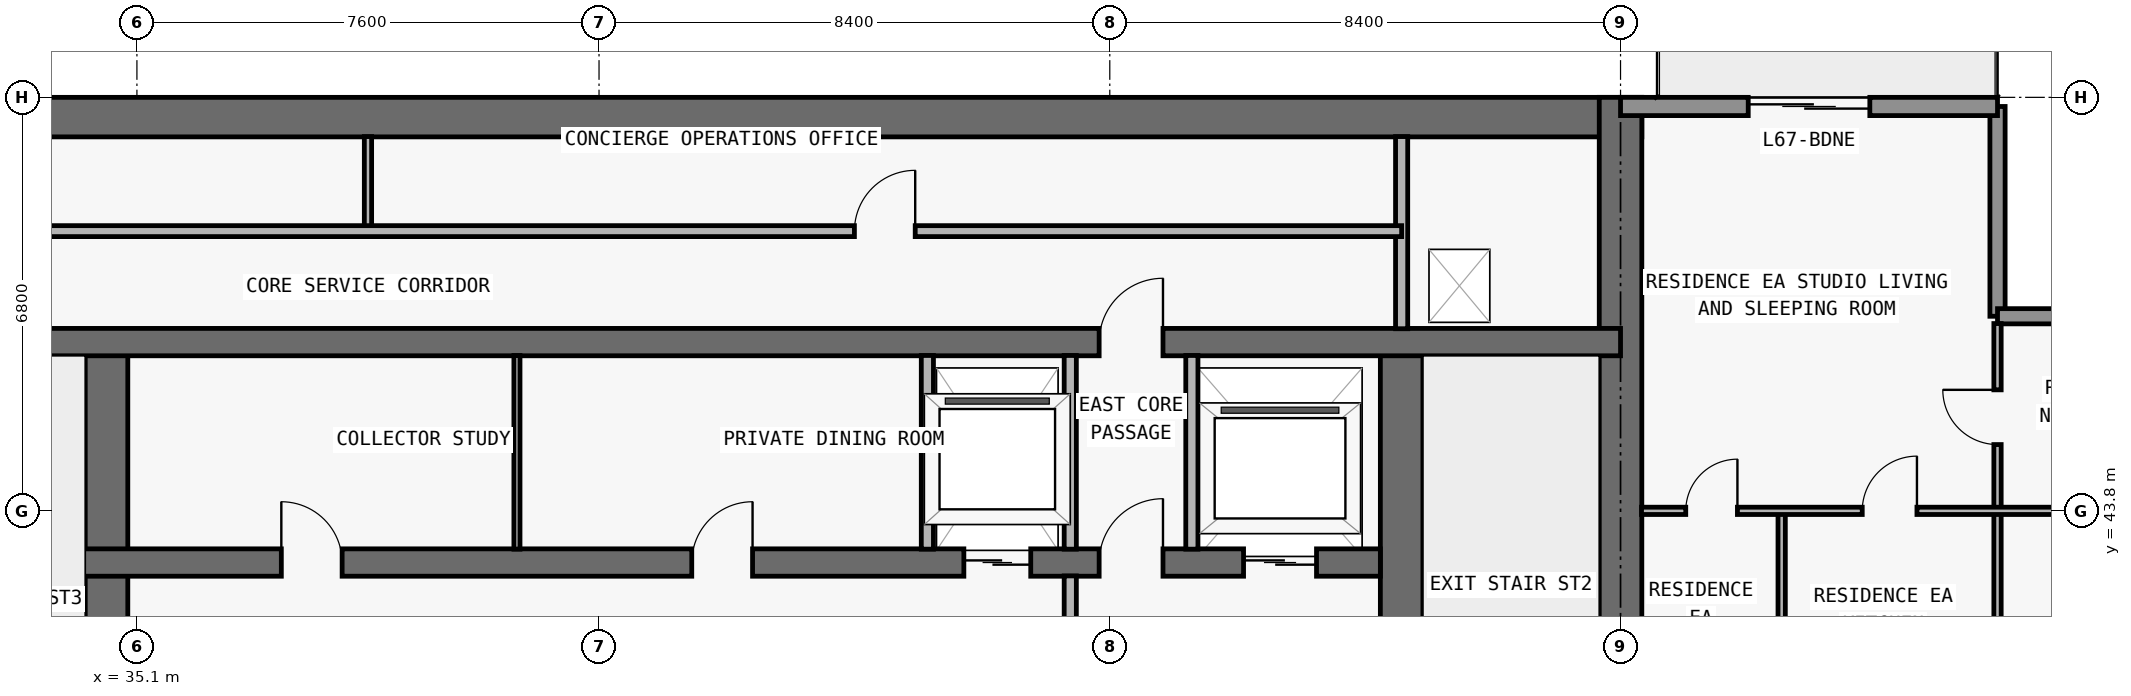
"""IFC4 building model, lengths in metres.
Left out: names, types, materials, properties, quantities, classifications, styles, units other than length and angle.
Written with IfcOpenShell. Run it as: python <this file> out.ifc"""

import sys

from ifc_helpers import new_model, si_unit, direction, frame, frame_2d, origin, place, context, subcontext, project, spatial, rectangle, extrude, element, fill, save


model = new_model("IFC4")
c1 = context("Model", 3, precision=1e-05, world=origin(), true_north=direction((0.0, 1.0)))
c2 = subcontext(c1, "Body", "Model", "MODEL_VIEW")
j1 = project(units=[si_unit("LENGTHUNIT", "METRE"), si_unit("PLANEANGLEUNIT", "RADIAN")], contexts=[c1])
p1 = place(None, origin())
s1 = spatial("IfcSite", under=j1, at=p1, CompositionType="ELEMENT")
p2 = place(p1, origin())
s2 = spatial("IfcBuilding", under=s1, at=p2, CompositionType="ELEMENT")
p3 = place(p2, frame((0.0, 0.0, 239.7)))
s3 = spatial("IfcBuildingStorey", under=s2, at=p3, CompositionType="ELEMENT", Elevation=239.7)
p4 = place(p3, frame((17.95, 50.275, 0.0), z_axis=(0.0, 0.0, 1.0), x_axis=(1.0, 0.0, 0.0)))
e1 = element("IfcWall", 1, at=p4, inside=s3, PredefinedType="SHEAR", context=c2, shape_type="SweptSolid", body=[
    extrude(rectangle(XDim=41.9, YDim=0.65, at=frame_2d((20.95, 0.0))), origin(), (0.0, 0.0, 1.0), 3.05),
])
p5 = place(p3, frame((59.5, 36.65, 0.0), z_axis=(0.0, 0.0, 1.0), x_axis=(0.0, 1.0, 0.0)))
e2 = element("IfcWall", 2, at=p5, inside=s3, PredefinedType="SHEAR", context=c2, shape_type="SweptSolid", body=[
    extrude(rectangle(XDim=13.95, YDim=0.7, at=frame_2d((6.975, 0.0))), origin(), (0.0, 0.0, 1.0), 3.05),
])
p6 = place(p3, frame((55.9, 37.0, 0.0), z_axis=(0.0, 0.0, 1.0), x_axis=(0.0, 1.0, 0.0)))
e3 = element("IfcWall", 3, at=p6, inside=s3, PredefinedType="SHEAR", context=c2, shape_type="SweptSolid", body=[
    extrude(rectangle(XDim=9.575, YDim=0.7, at=frame_2d((4.788, 0.0))), origin(), (0.0, 0.0, 1.0), 3.05),
])
p7 = place(p6, frame((0.55, 0.0, 0.0)))
e4 = element("IfcOpeningElement", 4, at=p7, cuts=e3, PredefinedType="OPENING", context=c2, shape_type="SweptSolid", body=[
    extrude(rectangle(XDim=1.1, YDim=2.15, at=frame_2d((0.55, 1.075))), frame((0.0, 0.36, 0.0), z_axis=(0.0, -1.0, 0.0), x_axis=(1.0, 0.0, 0.0)), (0.0, 0.0, 1.0), 0.72),
])
p8 = place(p3, frame((34.6, 37.0, 0.0), z_axis=(0.0, 0.0, 1.0), x_axis=(0.0, 1.0, 0.0)))
e5 = element("IfcWall", 5, at=p8, inside=s3, PredefinedType="SHEAR", context=c2, shape_type="SweptSolid", body=[
    extrude(rectangle(XDim=9.575, YDim=0.7, at=frame_2d((4.788, 0.0))), origin(), (0.0, 0.0, 1.0), 3.05),
])
p9 = place(p3, frame((22.25, 42.95, 0.0), z_axis=(0.0, 0.0, 1.0), x_axis=(1.0, 0.0, 0.0)))
e6 = element("IfcWall", 6, at=p9, inside=s3, PredefinedType="SHEAR", context=c2, shape_type="SweptSolid", body=[
    extrude(rectangle(XDim=33.3, YDim=0.45, at=frame_2d((16.65, 0.0))), origin(), (0.0, 0.0, 1.0), 3.05),
])
p10 = place(p9, frame((1.05, 0.0, 0.0)))
e7 = element("IfcOpeningElement", 7, at=p10, cuts=e6, PredefinedType="OPENING", context=c2, shape_type="SweptSolid", body=[
    extrude(rectangle(XDim=1.2, YDim=2.2, at=frame_2d((0.6, 1.1))), frame((0.0, 0.235, 0.0), z_axis=(0.0, -1.0, 0.0), x_axis=(1.0, 0.0, 0.0)), (0.0, 0.0, 1.0), 0.47),
])
p11 = place(p9, frame((31.05, 0.0, 0.0)))
e8 = element("IfcOpeningElement", 8, at=p11, cuts=e6, PredefinedType="OPENING", context=c2, shape_type="SweptSolid", body=[
    extrude(rectangle(XDim=1.2, YDim=2.2, at=frame_2d((0.6, 1.1))), frame((0.0, 0.235, 0.0), z_axis=(0.0, -1.0, 0.0), x_axis=(1.0, 0.0, 0.0)), (0.0, 0.0, 1.0), 0.47),
])
p12 = place(p9, frame((26.45, 0.0, 0.0)))
e9 = element("IfcOpeningElement", 9, at=p12, cuts=e6, PredefinedType="OPENING", context=c2, shape_type="SweptSolid", body=[
    extrude(rectangle(XDim=1.1, YDim=2.2, at=frame_2d((0.55, 1.1))), frame((0.0, 0.235, 0.0), z_axis=(0.0, -1.0, 0.0), x_axis=(1.0, 0.0, 0.0)), (0.0, 0.0, 1.0), 0.47),
])
p13 = place(p9, frame((5.95, 0.0, 0.0)))
e10 = element("IfcOpeningElement", 10, at=p13, cuts=e6, PredefinedType="OPENING", context=c2, shape_type="SweptSolid", body=[
    extrude(rectangle(XDim=1.1, YDim=2.2, at=frame_2d((0.55, 1.1))), frame((0.0, 0.235, 0.0), z_axis=(0.0, -1.0, 0.0), x_axis=(1.0, 0.0, 0.0)), (0.0, 0.0, 1.0), 0.47),
])
p14 = place(p9, frame((3.625, 0.0, 0.0)))
e11 = element("IfcOpeningElement", 11, at=p14, cuts=e6, PredefinedType="OPENING", context=c2, shape_type="SweptSolid", body=[
    extrude(rectangle(XDim=1.05, YDim=2.15, at=frame_2d((0.525, 1.075))), frame((0.0, 0.235, 0.0), z_axis=(0.0, -1.0, 0.0), x_axis=(1.0, 0.0, 0.0)), (0.0, 0.0, 1.0), 0.47),
])
p15 = place(p9, frame((28.675, 0.0, 0.0)))
e12 = element("IfcOpeningElement", 12, at=p15, cuts=e6, PredefinedType="OPENING", context=c2, shape_type="SweptSolid", body=[
    extrude(rectangle(XDim=1.05, YDim=2.15, at=frame_2d((0.525, 1.075))), frame((0.0, 0.235, 0.0), z_axis=(0.0, -1.0, 0.0), x_axis=(1.0, 0.0, 0.0)), (0.0, 0.0, 1.0), 0.47),
])
p16 = place(p9, frame((15.225, 0.0, 0.0)))
e13 = element("IfcOpeningElement", 13, at=p16, cuts=e6, PredefinedType="OPENING", context=c2, shape_type="SweptSolid", body=[
    extrude(rectangle(XDim=1.0, YDim=2.2, at=frame_2d((0.5, 1.1))), frame((0.0, 0.235, 0.0), z_axis=(0.0, -1.0, 0.0), x_axis=(1.0, 0.0, 0.0)), (0.0, 0.0, 1.0), 0.47),
])
p17 = place(p9, frame((21.975, 0.0, 0.0)))
e14 = element("IfcOpeningElement", 14, at=p17, cuts=e6, PredefinedType="OPENING", context=c2, shape_type="SweptSolid", body=[
    extrude(rectangle(XDim=1.0, YDim=2.2, at=frame_2d((0.5, 1.1))), frame((0.0, 0.235, 0.0), z_axis=(0.0, -1.0, 0.0), x_axis=(1.0, 0.0, 0.0)), (0.0, 0.0, 1.0), 0.47),
])
p18 = place(p3, frame((18.3, 46.575, 0.0), z_axis=(0.0, 0.0, 1.0), x_axis=(1.0, 0.0, 0.0)))
e15 = element("IfcWall", 15, at=p18, inside=s3, PredefinedType="SHEAR", context=c2, shape_type="SweptSolid", body=[
    extrude(rectangle(XDim=41.2, YDim=0.45, at=frame_2d((20.6, 0.0))), origin(), (0.0, 0.0, 1.0), 3.05),
])
p19 = place(p18, frame((7.575, 0.0, 0.0)))
e16 = element("IfcOpeningElement", 16, at=p19, cuts=e15, PredefinedType="OPENING", context=c2, shape_type="SweptSolid", body=[
    extrude(rectangle(XDim=1.05, YDim=2.15, at=frame_2d((0.525, 1.075))), frame((0.0, 0.235, 0.0), z_axis=(0.0, -1.0, 0.0), x_axis=(1.0, 0.0, 0.0)), (0.0, 0.0, 1.0), 0.47),
])
p20 = place(p18, frame((32.625, 0.0, 0.0)))
e17 = element("IfcOpeningElement", 17, at=p20, cuts=e15, PredefinedType="OPENING", context=c2, shape_type="SweptSolid", body=[
    extrude(rectangle(XDim=1.05, YDim=2.15, at=frame_2d((0.525, 1.075))), frame((0.0, 0.235, 0.0), z_axis=(0.0, -1.0, 0.0), x_axis=(1.0, 0.0, 0.0)), (0.0, 0.0, 1.0), 0.47),
])
p21 = place(p3, frame((65.7, 50.45, 0.0), z_axis=(0.0, 0.0, 1.0), x_axis=(0.0, -1.0, 0.0)))
e18 = element("IfcWall", 18, at=p21, inside=s3, PredefinedType="ELEMENTEDWALL", context=c2, shape_type="SweptSolid", body=[
    extrude(rectangle(XDim=3.45, YDim=0.25, at=frame_2d((1.725, 0.0))), origin(), (0.0, 0.0, 1.0), 3.05),
])
p22 = place(p3, frame((65.7, 47.0, 0.0), z_axis=(0.0, 0.0, 1.0), x_axis=(1.0, 0.0, 0.0)))
e19 = element("IfcWall", 19, at=p22, inside=s3, PredefinedType="ELEMENTEDWALL", context=c2, shape_type="SweptSolid", body=[
    extrude(rectangle(XDim=3.85, YDim=0.25, at=frame_2d((1.925, 0.0))), origin(), (0.0, 0.0, 1.0), 3.05),
])
p23 = place(p3, frame((59.5, 50.45, 0.0), z_axis=(0.0, 0.0, 1.0), x_axis=(1.0, 0.0, 0.0)))
e20 = element("IfcWall", 20, at=p23, inside=s3, PredefinedType="STANDARD", context=c2, shape_type="SweptSolid", body=[
    extrude(rectangle(XDim=6.2, YDim=0.3, at=frame_2d((3.1, 0.0))), origin(), (0.0, 0.0, 1.0), 3.05),
])
p24 = place(p23, frame((2.1, 0.0, 0.0)))
e21 = element("IfcOpeningElement", 21, at=p24, cuts=e20, PredefinedType="OPENING", context=c2, shape_type="SweptSolid", body=[
    extrude(rectangle(XDim=2.0, YDim=2.3, at=frame_2d((1.0, 1.15))), frame((0.0, 0.16, 0.0), z_axis=(0.0, -1.0, 0.0), x_axis=(1.0, 0.0, 0.0)), (0.0, 0.0, 1.0), 0.32),
])
p25 = place(p3, frame((38.9, 48.4, 0.0), z_axis=(0.0, 0.0, 1.0), x_axis=(0.0, 1.0, 0.0)))
e22 = element("IfcWall", 22, at=p25, inside=s3, PredefinedType="PARTITIONING", context=c2, shape_type="SweptSolid", body=[
    extrude(rectangle(XDim=1.555, YDim=0.12, at=frame_2d((0.778, 0.0))), origin(), (0.0, 0.0, 1.0), 3.05),
])
p26 = place(p3, frame((41.35, 43.17, 0.0), z_axis=(0.0, 0.0, 1.0), x_axis=(0.0, 1.0, 0.0)))
e23 = element("IfcWall", 23, at=p26, inside=s3, PredefinedType="MOVABLE", context=c2, shape_type="SweptSolid", body=[
    extrude(rectangle(XDim=3.185, YDim=0.1, at=frame_2d((1.593, 0.0))), origin(), (0.0, 0.0, 1.0), 3.05),
])
p27 = place(p3, frame((48.1, 43.17, 0.0), z_axis=(0.0, 0.0, 1.0), x_axis=(0.0, 1.0, 0.0)))
e24 = element("IfcWall", 24, at=p27, inside=s3, PredefinedType="PARTITIONING", context=c2, shape_type="SweptSolid", body=[
    extrude(rectangle(XDim=3.185, YDim=0.2, at=frame_2d((1.593, 0.0))), origin(), (0.0, 0.0, 1.0), 3.05),
])
p28 = place(p3, frame((50.45, 37.345, 0.0), z_axis=(0.0, 0.0, 1.0), x_axis=(0.0, 1.0, 0.0)))
e25 = element("IfcWall", 25, at=p28, inside=s3, PredefinedType="PARTITIONING", context=c2, shape_type="SweptSolid", body=[
    extrude(rectangle(XDim=5.385, YDim=0.2, at=frame_2d((2.692, 0.0))), origin(), (0.0, 0.0, 1.0), 3.05),
])
for number, where, z_axis, x_axis in (
    (26, (50.45, 43.17, 0.0), (0.0, 0.0, 1.0), (0.0, 1.0, 0.0)),
    (27, (52.45, 43.17, 0.0), (0.0, 0.0, 1.0), (0.0, 1.0, 0.0)),
):
    element("IfcWall", number, at=place(p3, frame(where, z_axis=z_axis, x_axis=x_axis)), inside=s3, PredefinedType="PARTITIONING", context=c2, shape_type="SweptSolid", body=[
        extrude(rectangle(XDim=3.185, YDim=0.2, at=frame_2d((1.593, 0.0))), origin(), (0.0, 0.0, 1.0), 3.05),
    ])
p29 = place(p3, frame((55.9, 46.795, 0.0), z_axis=(0.0, 0.0, 1.0), x_axis=(0.0, 1.0, 0.0)))
e28 = element("IfcWall", 28, at=p29, inside=s3, PredefinedType="PARTITIONING", context=c2, shape_type="SweptSolid", body=[
    extrude(rectangle(XDim=3.16, YDim=0.2, at=frame_2d((1.58, 0.0))), origin(), (0.0, 0.0, 1.0), 3.05),
])
p30 = place(p3, frame((62.15, 37.0, 0.0), z_axis=(0.0, 0.0, 1.0), x_axis=(0.0, 1.0, 0.0)))
e29 = element("IfcWall", 29, at=p30, inside=s3, PredefinedType="PARTITIONING", context=c2, shape_type="SweptSolid", body=[
    extrude(rectangle(XDim=6.8, YDim=0.12, at=frame_2d((3.4, 0.0))), origin(), (0.0, 0.0, 1.0), 3.05),
])
p31 = place(p30, frame((1.207, 0.0, 0.0)))
e30 = element("IfcOpeningElement", 30, at=p31, cuts=e29, PredefinedType="OPENING", context=c2, shape_type="SweptSolid", body=[
    extrude(rectangle(XDim=0.85, YDim=2.1, at=frame_2d((0.425, 1.05))), frame((0.0, 0.07, 0.0), z_axis=(0.0, -1.0, 0.0), x_axis=(1.0, 0.0, 0.0)), (0.0, 0.0, 1.0), 0.14),
])
p32 = place(p3, frame((65.7, 37.005, 0.0), z_axis=(0.0, 0.0, 1.0), x_axis=(0.0, 1.0, 0.0)))
e31 = element("IfcWall", 31, at=p32, inside=s3, PredefinedType="PARTITIONING", context=c2, shape_type="SweptSolid", body=[
    extrude(rectangle(XDim=9.875, YDim=0.12, at=frame_2d((4.938, 0.0))), origin(), (0.0, 0.0, 1.0), 3.05),
])
p33 = place(p32, frame((2.948, 0.0, 0.0)))
e32 = element("IfcOpeningElement", 32, at=p33, cuts=e31, PredefinedType="OPENING", context=c2, shape_type="SweptSolid", body=[
    extrude(rectangle(XDim=0.9, YDim=2.15, at=frame_2d((0.45, 1.075))), frame((0.0, 0.07, 0.0), z_axis=(0.0, -1.0, 0.0), x_axis=(1.0, 0.0, 0.0)), (0.0, 0.0, 1.0), 0.14),
])
p34 = place(p32, frame((7.885, 0.0, 0.0)))
e33 = element("IfcOpeningElement", 33, at=p34, cuts=e31, PredefinedType="OPENING", context=c2, shape_type="SweptSolid", body=[
    extrude(rectangle(XDim=0.9, YDim=2.15, at=frame_2d((0.45, 1.075))), frame((0.0, 0.07, 0.0), z_axis=(0.0, -1.0, 0.0), x_axis=(1.0, 0.0, 0.0)), (0.0, 0.0, 1.0), 0.14),
])
p35 = place(p3, frame((59.845, 43.8, 0.0), z_axis=(0.0, 0.0, 1.0), x_axis=(1.0, 0.0, 0.0)))
e34 = element("IfcWall", 34, at=p35, inside=s3, PredefinedType="PARTITIONING", context=c2, shape_type="SweptSolid", body=[
    extrude(rectangle(XDim=9.56, YDim=0.12, at=frame_2d((4.78, 0.0))), origin(), (0.0, 0.0, 1.0), 2.418),
])
p36 = place(p35, frame((3.63, 0.0, 0.0)))
e35 = element("IfcOpeningElement", 35, at=p36, cuts=e34, PredefinedType="OPENING", context=c2, shape_type="SweptSolid", body=[
    extrude(rectangle(XDim=0.9, YDim=2.15, at=frame_2d((0.45, 1.075))), frame((0.0, 0.07, 0.0), z_axis=(0.0, -1.0, 0.0), x_axis=(1.0, 0.0, 0.0)), (0.0, 0.0, 1.0), 0.14),
])
p37 = place(p35, frame((0.728, 0.0, 0.0)))
e36 = element("IfcOpeningElement", 36, at=p37, cuts=e34, PredefinedType="OPENING", context=c2, shape_type="SweptSolid", body=[
    extrude(rectangle(XDim=0.85, YDim=2.1, at=frame_2d((0.425, 1.05))), frame((0.0, 0.07, 0.0), z_axis=(0.0, -1.0, 0.0), x_axis=(1.0, 0.0, 0.0)), (0.0, 0.0, 1.0), 0.14),
])
p38 = place(p3, frame((21.9, 48.4, 0.0), z_axis=(0.0, 0.0, 1.0), x_axis=(1.0, 0.0, 0.0)))
e37 = element("IfcWall", 37, at=p38, inside=s3, PredefinedType="PARTITIONING", context=c2, shape_type="SweptSolid", body=[
    extrude(rectangle(XDim=34.0, YDim=0.18, at=frame_2d((17.0, 0.0))), origin(), (0.0, 0.0, 1.0), 3.05),
])
p39 = place(p38, frame((8.0, 0.0, 0.0)))
e38 = element("IfcOpeningElement", 38, at=p39, cuts=e37, PredefinedType="OPENING", context=c2, shape_type="SweptSolid", body=[
    extrude(rectangle(XDim=1.0, YDim=2.2, at=frame_2d((0.5, 1.1))), frame((0.0, 0.1, 0.0), z_axis=(0.0, -1.0, 0.0), x_axis=(1.0, 0.0, 0.0)), (0.0, 0.0, 1.0), 0.2),
])
p40 = place(p38, frame((25.0, 0.0, 0.0)))
e39 = element("IfcOpeningElement", 39, at=p40, cuts=e37, PredefinedType="OPENING", context=c2, shape_type="SweptSolid", body=[
    extrude(rectangle(XDim=1.0, YDim=2.2, at=frame_2d((0.5, 1.1))), frame((0.0, 0.1, 0.0), z_axis=(0.0, -1.0, 0.0), x_axis=(1.0, 0.0, 0.0)), (0.0, 0.0, 1.0), 0.2),
])
p41 = place(p24, origin())
e40 = element("IfcDoor", 40, at=p41, inside=s3, OperationType="DOUBLE_DOOR_SLIDING", PredefinedType="DOOR", context=c2, shape_type="SweptSolid", body=[
    extrude(rectangle(XDim=2.0, YDim=2.3, at=frame_2d((1.0, 1.15))), frame((0.0, 0.025, 0.0), z_axis=(0.0, -1.0, 0.0), x_axis=(1.0, 0.0, 0.0)), (0.0, 0.0, 1.0), 0.05),
])
fill(e21, e40)
p42 = place(p11, origin())
e41 = element("IfcDoor", 41, at=p42, inside=s3, OperationType="DOUBLE_DOOR_SLIDING", PredefinedType="DOOR", context=c2, shape_type="SweptSolid", body=[
    extrude(rectangle(XDim=1.2, YDim=2.2, at=frame_2d((0.6, 1.1))), frame((0.0, 0.025, 0.0), z_axis=(0.0, -1.0, 0.0), x_axis=(1.0, 0.0, 0.0)), (0.0, 0.0, 1.0), 0.05),
])
fill(e8, e41)
p43 = place(p12, origin())
e42 = element("IfcDoor", 42, at=p43, inside=s3, OperationType="DOUBLE_DOOR_SLIDING", PredefinedType="DOOR", context=c2, shape_type="SweptSolid", body=[
    extrude(rectangle(XDim=1.1, YDim=2.2, at=frame_2d((0.55, 1.1))), frame((0.0, 0.025, 0.0), z_axis=(0.0, -1.0, 0.0), x_axis=(1.0, 0.0, 0.0)), (0.0, 0.0, 1.0), 0.05),
])
fill(e9, e42)
p44 = place(p15, origin())
e43 = element("IfcDoor", 43, at=p44, inside=s3, OperationType="SINGLE_SWING_RIGHT", PredefinedType="DOOR", context=c2, shape_type="SweptSolid", body=[
    extrude(rectangle(XDim=1.05, YDim=2.15, at=frame_2d((0.525, 1.075))), frame((0.0, 0.025, 0.0), z_axis=(0.0, -1.0, 0.0), x_axis=(1.0, 0.0, 0.0)), (0.0, 0.0, 1.0), 0.05),
])
fill(e12, e43)
p45 = place(p16, origin())
e44 = element("IfcDoor", 44, at=p45, inside=s3, OperationType="SINGLE_SWING_LEFT", PredefinedType="DOOR", context=c2, shape_type="SweptSolid", body=[
    extrude(rectangle(XDim=1.0, YDim=2.2, at=frame_2d((0.5, 1.1))), frame((0.0, 0.025, 0.0), z_axis=(0.0, -1.0, 0.0), x_axis=(1.0, 0.0, 0.0)), (0.0, 0.0, 1.0), 0.05),
])
fill(e13, e44)
p46 = place(p17, origin())
e45 = element("IfcDoor", 45, at=p46, inside=s3, OperationType="SINGLE_SWING_RIGHT", PredefinedType="DOOR", context=c2, shape_type="SweptSolid", body=[
    extrude(rectangle(XDim=1.0, YDim=2.2, at=frame_2d((0.5, 1.1))), frame((0.0, 0.025, 0.0), z_axis=(0.0, -1.0, 0.0), x_axis=(1.0, 0.0, 0.0)), (0.0, 0.0, 1.0), 0.05),
])
fill(e14, e45)
p47 = place(p20, origin())
e46 = element("IfcDoor", 46, at=p47, inside=s3, OperationType="SINGLE_SWING_RIGHT", PredefinedType="DOOR", context=c2, shape_type="SweptSolid", body=[
    extrude(rectangle(XDim=1.05, YDim=2.15, at=frame_2d((0.525, 1.075))), frame((0.0, 0.025, 0.0), z_axis=(0.0, -1.0, 0.0), x_axis=(1.0, 0.0, 0.0)), (0.0, 0.0, 1.0), 0.05),
])
fill(e17, e46)
p48 = place(p40, origin())
e47 = element("IfcDoor", 47, at=p48, inside=s3, OperationType="SINGLE_SWING_RIGHT", PredefinedType="DOOR", context=c2, shape_type="SweptSolid", body=[
    extrude(rectangle(XDim=1.0, YDim=2.2, at=frame_2d((0.5, 1.1))), frame((0.0, 0.025, 0.0), z_axis=(0.0, -1.0, 0.0), x_axis=(1.0, 0.0, 0.0)), (0.0, 0.0, 1.0), 0.05),
])
fill(e39, e47)
p49 = place(p36, origin())
e48 = element("IfcDoor", 48, at=p49, inside=s3, OperationType="SINGLE_SWING_RIGHT", PredefinedType="DOOR", context=c2, shape_type="SweptSolid", body=[
    extrude(rectangle(XDim=0.9, YDim=2.15, at=frame_2d((0.45, 1.075))), frame((0.0, 0.025, 0.0), z_axis=(0.0, -1.0, 0.0), x_axis=(1.0, 0.0, 0.0)), (0.0, 0.0, 1.0), 0.05),
])
fill(e35, e48)
p50 = place(p37, origin())
e49 = element("IfcDoor", 49, at=p50, inside=s3, OperationType="SINGLE_SWING_RIGHT", PredefinedType="DOOR", context=c2, shape_type="SweptSolid", body=[
    extrude(rectangle(XDim=0.85, YDim=2.1, at=frame_2d((0.425, 1.05))), frame((0.0, 0.025, 0.0), z_axis=(0.0, -1.0, 0.0), x_axis=(1.0, 0.0, 0.0)), (0.0, 0.0, 1.0), 0.05),
])
fill(e36, e49)
p51 = place(p34, origin())
e50 = element("IfcDoor", 50, at=p51, inside=s3, OperationType="SINGLE_SWING_RIGHT", PredefinedType="DOOR", context=c2, shape_type="SweptSolid", body=[
    extrude(rectangle(XDim=0.9, YDim=2.15, at=frame_2d((0.45, 1.075))), frame((0.0, 0.025, 0.0), z_axis=(0.0, -1.0, 0.0), x_axis=(1.0, 0.0, 0.0)), (0.0, 0.0, 1.0), 0.05),
])
fill(e33, e50)
save(model, sys.argv[1])
